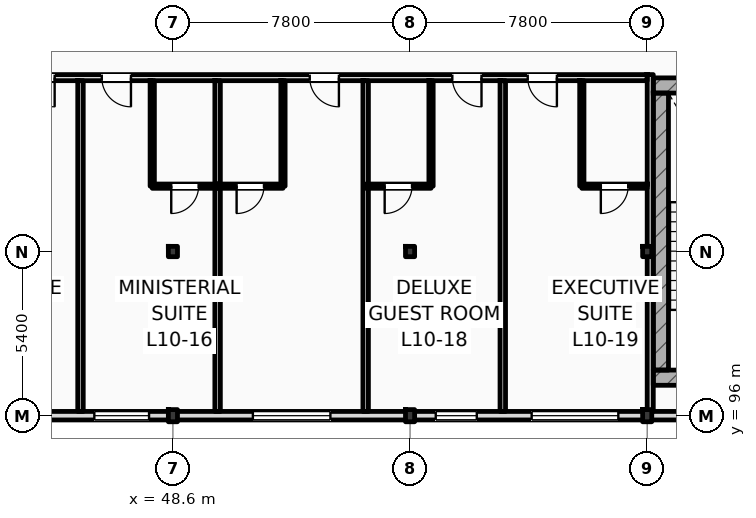
"""IFC4 building model, lengths in metres.
Left out: names, types, materials, properties, quantities, classifications, styles, units other than length and angle.
Written with IfcOpenShell. Run it as: python <this file> out.ifc"""

import sys

from ifc_helpers import new_model, si_unit, direction, frame, frame_2d, origin, origin_2d, place, context, subcontext, project, spatial, rectangle, i_section, extrude, element, fill, save


model = new_model("IFC4")
c1 = context("Model", 3, precision=1e-05, world=origin(), true_north=direction((0.0, 1.0)))
c2 = subcontext(c1, "Body", "Model", "MODEL_VIEW")
j1 = project(units=[si_unit("LENGTHUNIT", "METRE"), si_unit("PLANEANGLEUNIT", "RADIAN")], contexts=[c1])
p1 = place(None, origin())
s1 = spatial("IfcSite", under=j1, at=p1, CompositionType="ELEMENT")
p2 = place(p1, origin())
s2 = spatial("IfcBuilding", under=s1, at=p2, CompositionType="ELEMENT")
p3 = place(p2, frame((0.0, 0.0, 42.6)))
s3 = spatial("IfcBuildingStorey", under=s2, at=p3, CompositionType="ELEMENT", Elevation=42.6)
p4 = place(p3, frame((48.6, 96.0, 0.0), z_axis=(0.0, 0.0, 1.0), x_axis=(1.0, 0.0, 0.0)))
e1 = element("IfcColumn", 1, at=p4, inside=s3, PredefinedType="COLUMN", context=c2, shape_type="SweptSolid", body=[
    extrude(i_section(OverallWidth=0.3, OverallDepth=0.4, WebThickness=0.013, FlangeThickness=0.024, FilletRadius=0.027, at=origin_2d()), origin(), (0.0, 0.0, 1.0), 4.2),
])
p5 = place(p3, frame((48.6, 101.4, 0.0), z_axis=(0.0, 0.0, 1.0), x_axis=(1.0, 0.0, 0.0)))
e2 = element("IfcColumn", 2, at=p5, inside=s3, PredefinedType="COLUMN", context=c2, shape_type="SweptSolid", body=[
    extrude(i_section(OverallWidth=0.3, OverallDepth=0.34, WebThickness=0.012, FlangeThickness=0.021, FilletRadius=0.027, at=origin_2d()), origin(), (0.0, 0.0, 1.0), 4.2),
])
p6 = place(p3, frame((56.4, 96.0, 0.0), z_axis=(0.0, 0.0, 1.0), x_axis=(1.0, 0.0, 0.0)))
e3 = element("IfcColumn", 3, at=p6, inside=s3, PredefinedType="COLUMN", context=c2, shape_type="SweptSolid", body=[
    extrude(i_section(OverallWidth=0.3, OverallDepth=0.4, WebThickness=0.013, FlangeThickness=0.024, FilletRadius=0.027, at=origin_2d()), origin(), (0.0, 0.0, 1.0), 4.2),
])
p7 = place(p3, frame((56.4, 101.4, 0.0), z_axis=(0.0, 0.0, 1.0), x_axis=(1.0, 0.0, 0.0)))
e4 = element("IfcColumn", 4, at=p7, inside=s3, PredefinedType="COLUMN", context=c2, shape_type="SweptSolid", body=[
    extrude(i_section(OverallWidth=0.3, OverallDepth=0.34, WebThickness=0.012, FlangeThickness=0.021, FilletRadius=0.027, at=origin_2d()), origin(), (0.0, 0.0, 1.0), 4.2),
])
p8 = place(p3, frame((64.2, 96.0, 0.0), z_axis=(0.0, 0.0, 1.0), x_axis=(1.0, 0.0, 0.0)))
e5 = element("IfcColumn", 5, at=p8, inside=s3, PredefinedType="COLUMN", context=c2, shape_type="SweptSolid", body=[
    extrude(i_section(OverallWidth=0.3, OverallDepth=0.4, WebThickness=0.013, FlangeThickness=0.024, FilletRadius=0.027, at=origin_2d()), origin(), (0.0, 0.0, 1.0), 4.2),
])
p9 = place(p3, frame((64.2, 101.4, 0.0), z_axis=(0.0, 0.0, 1.0), x_axis=(1.0, 0.0, 0.0)))
e6 = element("IfcColumn", 6, at=p9, inside=s3, PredefinedType="COLUMN", context=c2, shape_type="SweptSolid", body=[
    extrude(i_section(OverallWidth=0.3, OverallDepth=0.34, WebThickness=0.012, FlangeThickness=0.021, FilletRadius=0.027, at=origin_2d()), origin(), (0.0, 0.0, 1.0), 4.2),
])
for number, where, z_axis, x_axis in (
    (7, (64.4, 106.862, 0.0), (0.0, 0.0, 1.0), (1.0, 0.0, 0.0)),
    (8, (64.4, 97.25, 0.0), (0.0, 0.0, 1.0), (1.0, 0.0, 0.0)),
):
    element("IfcWall", number, at=place(p3, frame(where, z_axis=z_axis, x_axis=x_axis)), inside=s3, PredefinedType="SHEAR", context=c2, shape_type="SweptSolid", body=[
        extrude(rectangle(XDim=5.16, YDim=0.5, at=frame_2d((2.58, 0.0))), origin(), (0.0, 0.0, 1.0), 4.2),
    ])
p10 = place(p3, frame((64.65, 97.5, 0.0), z_axis=(0.0, 0.0, 1.0), x_axis=(0.0, 1.0, 0.0)))
e9 = element("IfcWall", 9, at=p10, inside=s3, PredefinedType="SHEAR", context=c2, shape_type="SweptSolid", body=[
    extrude(rectangle(XDim=9.112, YDim=0.5, at=frame_2d((4.556, 0.0))), origin(), (0.0, 0.0, 1.0), 4.2),
])
p11 = place(p3, frame((25.2, 96.0, 0.0), z_axis=(0.0, 0.0, 1.0), x_axis=(1.0, 0.0, 0.0)))
e10 = element("IfcWall", 10, at=p11, inside=s3, PredefinedType="STANDARD", context=c2, shape_type="SweptSolid", body=[
    extrude(rectangle(XDim=70.2, YDim=0.28, at=frame_2d((35.1, 0.0))), origin(), (0.0, 0.0, 1.0), 3.42),
])
p12 = place(p11, frame((16.83, 0.0, 0.9)))
e11 = element("IfcOpeningElement", 11, at=p12, cuts=e10, PredefinedType="OPENING", context=c2, shape_type="SweptSolid", body=[
    extrude(rectangle(XDim=2.25, YDim=2.15, at=frame_2d((1.125, 1.075))), frame((0.0, 0.15, 0.0), z_axis=(0.0, -1.0, 0.0), x_axis=(1.0, 0.0, 0.0)), (0.0, 0.0, 1.0), 0.3),
])
p13 = place(p11, frame((20.815, 0.0, 0.9)))
e12 = element("IfcOpeningElement", 12, at=p13, cuts=e10, PredefinedType="OPENING", context=c2, shape_type="SweptSolid", body=[
    extrude(rectangle(XDim=1.8, YDim=2.2, at=frame_2d((0.9, 1.1))), frame((0.0, 0.15, 0.0), z_axis=(0.0, -1.0, 0.0), x_axis=(1.0, 0.0, 0.0)), (0.0, 0.0, 1.0), 0.3),
])
p14 = place(p11, frame((26.03, 0.0, 0.9)))
e13 = element("IfcOpeningElement", 13, at=p14, cuts=e10, PredefinedType="OPENING", context=c2, shape_type="SweptSolid", body=[
    extrude(rectangle(XDim=2.55, YDim=2.25, at=frame_2d((1.275, 1.125))), frame((0.0, 0.15, 0.0), z_axis=(0.0, -1.0, 0.0), x_axis=(1.0, 0.0, 0.0)), (0.0, 0.0, 1.0), 0.3),
])
p15 = place(p11, frame((32.045, 0.0, 0.9)))
e14 = element("IfcOpeningElement", 14, at=p15, cuts=e10, PredefinedType="OPENING", context=c2, shape_type="SweptSolid", body=[
    extrude(rectangle(XDim=1.35, YDim=2.3, at=frame_2d((0.675, 1.15))), frame((0.0, 0.15, 0.0), z_axis=(0.0, -1.0, 0.0), x_axis=(1.0, 0.0, 0.0)), (0.0, 0.0, 1.0), 0.3),
])
p16 = place(p11, frame((35.2, 0.0, 0.9)))
e15 = element("IfcOpeningElement", 15, at=p16, cuts=e10, PredefinedType="OPENING", context=c2, shape_type="SweptSolid", body=[
    extrude(rectangle(XDim=2.85, YDim=2.34, at=frame_2d((1.425, 1.17))), frame((0.0, 0.15, 0.0), z_axis=(0.0, -1.0, 0.0), x_axis=(1.0, 0.0, 0.0)), (0.0, 0.0, 1.0), 0.3),
])
p17 = place(p11, frame((55.544, 0.0, 0.9)))
e16 = element("IfcOpeningElement", 16, at=p17, cuts=e10, PredefinedType="OPENING", context=c2, shape_type="SweptSolid", body=[
    extrude(rectangle(XDim=3.0, YDim=2.34, at=frame_2d((1.5, 1.17))), frame((0.0, 0.15, 0.0), z_axis=(0.0, -1.0, 0.0), x_axis=(1.0, 0.0, 0.0)), (0.0, 0.0, 1.0), 0.3),
])
p18 = place(p11, frame((60.151, 0.0, 0.9)))
e17 = element("IfcOpeningElement", 17, at=p18, cuts=e10, PredefinedType="OPENING", context=c2, shape_type="SweptSolid", body=[
    extrude(rectangle(XDim=1.35, YDim=2.34, at=frame_2d((0.675, 1.17))), frame((0.0, 0.15, 0.0), z_axis=(0.0, -1.0, 0.0), x_axis=(1.0, 0.0, 0.0)), (0.0, 0.0, 1.0), 0.3),
])
p19 = place(p11, frame((65.582, 0.0, 0.9)))
e18 = element("IfcOpeningElement", 18, at=p19, cuts=e10, PredefinedType="OPENING", context=c2, shape_type="SweptSolid", body=[
    extrude(rectangle(XDim=3.4, YDim=2.34, at=frame_2d((1.7, 1.17))), frame((0.0, 0.15, 0.0), z_axis=(0.0, -1.0, 0.0), x_axis=(1.0, 0.0, 0.0)), (0.0, 0.0, 1.0), 0.3),
])
p20 = place(p3, frame((40.76, 107.12, 0.0), z_axis=(0.0, 0.0, 1.0), x_axis=(1.0, 0.0, 0.0)))
e19 = element("IfcWall", 19, at=p20, inside=s3, PredefinedType="PARTITIONING", context=c2, shape_type="SweptSolid", body=[
    extrude(rectangle(XDim=23.44, YDim=0.2, at=frame_2d((11.72, 0.0))), origin(), (0.0, 0.0, 1.0), 3.94),
])
p21 = place(p20, frame((2.99, 0.0, 0.0)))
e20 = element("IfcOpeningElement", 20, at=p21, cuts=e19, PredefinedType="OPENING", context=c2, shape_type="SweptSolid", body=[
    extrude(rectangle(XDim=0.96, YDim=2.2, at=frame_2d((0.48, 1.1))), frame((0.0, 0.11, 0.0), z_axis=(0.0, -1.0, 0.0), x_axis=(1.0, 0.0, 0.0)), (0.0, 0.0, 1.0), 0.22),
])
p22 = place(p20, frame((5.5, 0.0, 0.0)))
e21 = element("IfcOpeningElement", 21, at=p22, cuts=e19, PredefinedType="OPENING", context=c2, shape_type="SweptSolid", body=[
    extrude(rectangle(XDim=0.96, YDim=2.2, at=frame_2d((0.48, 1.1))), frame((0.0, 0.11, 0.0), z_axis=(0.0, -1.0, 0.0), x_axis=(1.0, 0.0, 0.0)), (0.0, 0.0, 1.0), 0.22),
])
p23 = place(p20, frame((12.34, 0.0, 0.0)))
e22 = element("IfcOpeningElement", 22, at=p23, cuts=e19, PredefinedType="OPENING", context=c2, shape_type="SweptSolid", body=[
    extrude(rectangle(XDim=0.96, YDim=2.2, at=frame_2d((0.48, 1.1))), frame((0.0, 0.11, 0.0), z_axis=(0.0, -1.0, 0.0), x_axis=(1.0, 0.0, 0.0)), (0.0, 0.0, 1.0), 0.22),
])
p24 = place(p20, frame((17.03, 0.0, 0.0)))
e23 = element("IfcOpeningElement", 23, at=p24, cuts=e19, PredefinedType="OPENING", context=c2, shape_type="SweptSolid", body=[
    extrude(rectangle(XDim=0.96, YDim=2.2, at=frame_2d((0.48, 1.1))), frame((0.0, 0.11, 0.0), z_axis=(0.0, -1.0, 0.0), x_axis=(1.0, 0.0, 0.0)), (0.0, 0.0, 1.0), 0.22),
])
p25 = place(p20, frame((19.51, 0.0, 0.0)))
e24 = element("IfcOpeningElement", 24, at=p25, cuts=e19, PredefinedType="OPENING", context=c2, shape_type="SweptSolid", body=[
    extrude(rectangle(XDim=0.96, YDim=2.2, at=frame_2d((0.48, 1.1))), frame((0.0, 0.11, 0.0), z_axis=(0.0, -1.0, 0.0), x_axis=(1.0, 0.0, 0.0)), (0.0, 0.0, 1.0), 0.22),
])
p26 = place(p3, frame((64.3, 96.14, 0.0), z_axis=(0.0, 0.0, 1.0), x_axis=(0.0, 1.0, 0.0)))
e25 = element("IfcWall", 25, at=p26, inside=s3, PredefinedType="PARTITIONING", context=c2, shape_type="SweptSolid", body=[
    extrude(rectangle(XDim=11.08, YDim=0.2, at=frame_2d((5.54, 0.0))), origin(), (0.0, 0.0, 1.0), 3.57),
])
for number, where, z_axis, x_axis in (
    (26, (45.56, 96.14, 0.0), (0.0, 0.0, 1.0), (0.0, 1.0, 0.0)),
    (27, (50.07, 96.14, 0.0), (0.0, 0.0, 1.0), (0.0, 1.0, 0.0)),
):
    element("IfcWall", number, at=place(p3, frame(where, z_axis=z_axis, x_axis=x_axis)), inside=s3, PredefinedType="PARTITIONING", context=c2, shape_type="SweptSolid", body=[
        extrude(rectangle(XDim=10.88, YDim=0.18, at=frame_2d((5.44, 0.0))), origin(), (0.0, 0.0, 1.0), 3.94),
    ])
p27 = place(p3, frame((47.92, 103.55, 0.0), z_axis=(0.0, 0.0, 1.0), x_axis=(0.0, 1.0, 0.0)))
e28 = element("IfcWall", 28, at=p27, inside=s3, PredefinedType="PARTITIONING", context=c2, shape_type="SweptSolid", body=[
    extrude(rectangle(XDim=3.47, YDim=0.14, at=frame_2d((1.735, 0.0))), origin(), (0.0, 0.0, 1.0), 3.94),
])
p28 = place(p3, frame((47.92, 103.55, 0.0), z_axis=(0.0, 0.0, 1.0), x_axis=(1.0, 0.0, 0.0)))
e29 = element("IfcWall", 29, at=p28, inside=s3, PredefinedType="PARTITIONING", context=c2, shape_type="SweptSolid", body=[
    extrude(rectangle(XDim=2.15, YDim=0.14, at=frame_2d((1.075, 0.0))), origin(), (0.0, 0.0, 1.0), 3.94),
])
p29 = place(p28, frame((0.625, 0.0, 0.0)))
e30 = element("IfcOpeningElement", 30, at=p29, cuts=e29, PredefinedType="OPENING", context=c2, shape_type="SweptSolid", body=[
    extrude(rectangle(XDim=0.9, YDim=2.1, at=frame_2d((0.45, 1.05))), frame((0.0, 0.08, 0.0), z_axis=(0.0, -1.0, 0.0), x_axis=(1.0, 0.0, 0.0)), (0.0, 0.0, 1.0), 0.16),
])
p30 = place(p3, frame((54.94, 96.14, 0.0), z_axis=(0.0, 0.0, 1.0), x_axis=(0.0, 1.0, 0.0)))
e31 = element("IfcWall", 31, at=p30, inside=s3, PredefinedType="PARTITIONING", context=c2, shape_type="SweptSolid", body=[
    extrude(rectangle(XDim=10.88, YDim=0.18, at=frame_2d((5.44, 0.0))), origin(), (0.0, 0.0, 1.0), 3.94),
])
p31 = place(p3, frame((52.22, 103.55, 0.0), z_axis=(0.0, 0.0, 1.0), x_axis=(0.0, 1.0, 0.0)))
e32 = element("IfcWall", 32, at=p31, inside=s3, PredefinedType="PARTITIONING", context=c2, shape_type="SweptSolid", body=[
    extrude(rectangle(XDim=3.47, YDim=0.14, at=frame_2d((1.735, 0.0))), origin(), (0.0, 0.0, 1.0), 3.94),
])
p32 = place(p3, frame((50.07, 103.55, 0.0), z_axis=(0.0, 0.0, 1.0), x_axis=(1.0, 0.0, 0.0)))
e33 = element("IfcWall", 33, at=p32, inside=s3, PredefinedType="PARTITIONING", context=c2, shape_type="SweptSolid", body=[
    extrude(rectangle(XDim=2.15, YDim=0.14, at=frame_2d((1.075, 0.0))), origin(), (0.0, 0.0, 1.0), 3.94),
])
p33 = place(p32, frame((0.625, 0.0, 0.0)))
e34 = element("IfcOpeningElement", 34, at=p33, cuts=e33, PredefinedType="OPENING", context=c2, shape_type="SweptSolid", body=[
    extrude(rectangle(XDim=0.9, YDim=2.1, at=frame_2d((0.45, 1.05))), frame((0.0, 0.08, 0.0), z_axis=(0.0, -1.0, 0.0), x_axis=(1.0, 0.0, 0.0)), (0.0, 0.0, 1.0), 0.16),
])
p34 = place(p3, frame((59.45, 96.14, 0.0), z_axis=(0.0, 0.0, 1.0), x_axis=(0.0, 1.0, 0.0)))
e35 = element("IfcWall", 35, at=p34, inside=s3, PredefinedType="PARTITIONING", context=c2, shape_type="SweptSolid", body=[
    extrude(rectangle(XDim=10.88, YDim=0.18, at=frame_2d((5.44, 0.0))), origin(), (0.0, 0.0, 1.0), 3.94),
])
p35 = place(p3, frame((57.09, 103.55, 0.0), z_axis=(0.0, 0.0, 1.0), x_axis=(0.0, 1.0, 0.0)))
e36 = element("IfcWall", 36, at=p35, inside=s3, PredefinedType="PARTITIONING", context=c2, shape_type="SweptSolid", body=[
    extrude(rectangle(XDim=3.47, YDim=0.14, at=frame_2d((1.735, 0.0))), origin(), (0.0, 0.0, 1.0), 3.94),
])
p36 = place(p3, frame((54.94, 103.55, 0.0), z_axis=(0.0, 0.0, 1.0), x_axis=(1.0, 0.0, 0.0)))
e37 = element("IfcWall", 37, at=p36, inside=s3, PredefinedType="PARTITIONING", context=c2, shape_type="SweptSolid", body=[
    extrude(rectangle(XDim=2.15, YDim=0.14, at=frame_2d((1.075, 0.0))), origin(), (0.0, 0.0, 1.0), 3.94),
])
p37 = place(p36, frame((0.625, 0.0, 0.0)))
e38 = element("IfcOpeningElement", 38, at=p37, cuts=e37, PredefinedType="OPENING", context=c2, shape_type="SweptSolid", body=[
    extrude(rectangle(XDim=0.9, YDim=2.1, at=frame_2d((0.45, 1.05))), frame((0.0, 0.08, 0.0), z_axis=(0.0, -1.0, 0.0), x_axis=(1.0, 0.0, 0.0)), (0.0, 0.0, 1.0), 0.16),
])
p38 = place(p3, frame((62.05, 103.55, 0.0), z_axis=(0.0, 0.0, 1.0), x_axis=(0.0, 1.0, 0.0)))
e39 = element("IfcWall", 39, at=p38, inside=s3, PredefinedType="PARTITIONING", context=c2, shape_type="SweptSolid", body=[
    extrude(rectangle(XDim=3.47, YDim=0.14, at=frame_2d((1.735, 0.0))), origin(), (0.0, 0.0, 1.0), 3.94),
])
p39 = place(p3, frame((62.05, 103.55, 0.0), z_axis=(0.0, 0.0, 1.0), x_axis=(1.0, 0.0, 0.0)))
e40 = element("IfcWall", 40, at=p39, inside=s3, PredefinedType="PARTITIONING", context=c2, shape_type="SweptSolid", body=[
    extrude(rectangle(XDim=2.15, YDim=0.14, at=frame_2d((1.075, 0.0))), origin(), (0.0, 0.0, 1.0), 3.94),
])
p40 = place(p39, frame((0.625, 0.0, 0.0)))
e41 = element("IfcOpeningElement", 41, at=p40, cuts=e40, PredefinedType="OPENING", context=c2, shape_type="SweptSolid", body=[
    extrude(rectangle(XDim=0.9, YDim=2.1, at=frame_2d((0.45, 1.05))), frame((0.0, 0.08, 0.0), z_axis=(0.0, -1.0, 0.0), x_axis=(1.0, 0.0, 0.0)), (0.0, 0.0, 1.0), 0.16),
])
p41 = place(p13, origin())
e42 = element("IfcWindow", 42, at=p41, inside=s3, PartitioningType="DOUBLE_PANEL_VERTICAL", PredefinedType="WINDOW", context=c2, shape_type="SweptSolid", body=[
    extrude(rectangle(XDim=1.8, YDim=2.2, at=frame_2d((0.9, 1.1))), frame((0.0, 0.03, 0.0), z_axis=(0.0, -1.0, 0.0), x_axis=(1.0, 0.0, 0.0)), (0.0, 0.0, 1.0), 0.06),
])
fill(e12, e42)
p42 = place(p14, origin())
e43 = element("IfcWindow", 43, at=p42, inside=s3, PartitioningType="DOUBLE_PANEL_VERTICAL", PredefinedType="WINDOW", context=c2, shape_type="SweptSolid", body=[
    extrude(rectangle(XDim=2.55, YDim=2.25, at=frame_2d((1.275, 1.125))), frame((0.0, 0.03, 0.0), z_axis=(0.0, -1.0, 0.0), x_axis=(1.0, 0.0, 0.0)), (0.0, 0.0, 1.0), 0.06),
])
fill(e13, e43)
p43 = place(p15, origin())
e44 = element("IfcWindow", 44, at=p43, inside=s3, PartitioningType="DOUBLE_PANEL_VERTICAL", PredefinedType="WINDOW", context=c2, shape_type="SweptSolid", body=[
    extrude(rectangle(XDim=1.35, YDim=2.3, at=frame_2d((0.675, 1.15))), frame((0.0, 0.03, 0.0), z_axis=(0.0, -1.0, 0.0), x_axis=(1.0, 0.0, 0.0)), (0.0, 0.0, 1.0), 0.06),
])
fill(e14, e44)
p44 = place(p16, origin())
e45 = element("IfcWindow", 45, at=p44, inside=s3, PartitioningType="DOUBLE_PANEL_VERTICAL", PredefinedType="WINDOW", context=c2, shape_type="SweptSolid", body=[
    extrude(rectangle(XDim=2.85, YDim=2.34, at=frame_2d((1.425, 1.17))), frame((0.0, 0.03, 0.0), z_axis=(0.0, -1.0, 0.0), x_axis=(1.0, 0.0, 0.0)), (0.0, 0.0, 1.0), 0.06),
])
fill(e15, e45)
p45 = place(p21, frame((0.96, 0.0, 0.0), z_axis=(0.0, 0.0, 1.0), x_axis=(-1.0, 0.0, 0.0)))
e46 = element("IfcDoor", 46, at=p45, inside=s3, OperationType="SINGLE_SWING_RIGHT", PredefinedType="DOOR", context=c2, shape_type="SweptSolid", body=[
    extrude(rectangle(XDim=0.96, YDim=2.2, at=frame_2d((0.48, 1.1))), frame((0.0, 0.025, 0.0), z_axis=(0.0, -1.0, 0.0), x_axis=(1.0, 0.0, 0.0)), (0.0, 0.0, 1.0), 0.05),
])
fill(e20, e46)
p46 = place(p22, frame((0.96, 0.0, 0.0), z_axis=(0.0, 0.0, 1.0), x_axis=(-1.0, 0.0, 0.0)))
e47 = element("IfcDoor", 47, at=p46, inside=s3, OperationType="SINGLE_SWING_RIGHT", PredefinedType="DOOR", context=c2, shape_type="SweptSolid", body=[
    extrude(rectangle(XDim=0.96, YDim=2.2, at=frame_2d((0.48, 1.1))), frame((0.0, 0.025, 0.0), z_axis=(0.0, -1.0, 0.0), x_axis=(1.0, 0.0, 0.0)), (0.0, 0.0, 1.0), 0.05),
])
fill(e21, e47)
p47 = place(p29, frame((0.9, 0.0, 0.0), z_axis=(0.0, 0.0, 1.0), x_axis=(-1.0, 0.0, 0.0)))
e48 = element("IfcDoor", 48, at=p47, inside=s3, OperationType="SINGLE_SWING_LEFT", PredefinedType="DOOR", context=c2, shape_type="SweptSolid", body=[
    extrude(rectangle(XDim=0.9, YDim=2.1, at=frame_2d((0.45, 1.05))), frame((0.0, 0.025, 0.0), z_axis=(0.0, -1.0, 0.0), x_axis=(1.0, 0.0, 0.0)), (0.0, 0.0, 1.0), 0.05),
])
fill(e30, e48)
p48 = place(p23, frame((0.96, 0.0, 0.0), z_axis=(0.0, 0.0, 1.0), x_axis=(-1.0, 0.0, 0.0)))
e49 = element("IfcDoor", 49, at=p48, inside=s3, OperationType="SINGLE_SWING_RIGHT", PredefinedType="DOOR", context=c2, shape_type="SweptSolid", body=[
    extrude(rectangle(XDim=0.96, YDim=2.2, at=frame_2d((0.48, 1.1))), frame((0.0, 0.025, 0.0), z_axis=(0.0, -1.0, 0.0), x_axis=(1.0, 0.0, 0.0)), (0.0, 0.0, 1.0), 0.05),
])
fill(e22, e49)
p49 = place(p33, frame((0.9, 0.0, 0.0), z_axis=(0.0, 0.0, 1.0), x_axis=(-1.0, 0.0, 0.0)))
e50 = element("IfcDoor", 50, at=p49, inside=s3, OperationType="SINGLE_SWING_LEFT", PredefinedType="DOOR", context=c2, shape_type="SweptSolid", body=[
    extrude(rectangle(XDim=0.9, YDim=2.1, at=frame_2d((0.45, 1.05))), frame((0.0, 0.025, 0.0), z_axis=(0.0, -1.0, 0.0), x_axis=(1.0, 0.0, 0.0)), (0.0, 0.0, 1.0), 0.05),
])
fill(e34, e50)
p50 = place(p24, frame((0.96, 0.0, 0.0), z_axis=(0.0, 0.0, 1.0), x_axis=(-1.0, 0.0, 0.0)))
e51 = element("IfcDoor", 51, at=p50, inside=s3, OperationType="SINGLE_SWING_RIGHT", PredefinedType="DOOR", context=c2, shape_type="SweptSolid", body=[
    extrude(rectangle(XDim=0.96, YDim=2.2, at=frame_2d((0.48, 1.1))), frame((0.0, 0.025, 0.0), z_axis=(0.0, -1.0, 0.0), x_axis=(1.0, 0.0, 0.0)), (0.0, 0.0, 1.0), 0.05),
])
fill(e23, e51)
p51 = place(p37, frame((0.9, 0.0, 0.0), z_axis=(0.0, 0.0, 1.0), x_axis=(-1.0, 0.0, 0.0)))
e52 = element("IfcDoor", 52, at=p51, inside=s3, OperationType="SINGLE_SWING_LEFT", PredefinedType="DOOR", context=c2, shape_type="SweptSolid", body=[
    extrude(rectangle(XDim=0.9, YDim=2.1, at=frame_2d((0.45, 1.05))), frame((0.0, 0.025, 0.0), z_axis=(0.0, -1.0, 0.0), x_axis=(1.0, 0.0, 0.0)), (0.0, 0.0, 1.0), 0.05),
])
fill(e38, e52)
p52 = place(p25, frame((0.96, 0.0, 0.0), z_axis=(0.0, 0.0, 1.0), x_axis=(-1.0, 0.0, 0.0)))
e53 = element("IfcDoor", 53, at=p52, inside=s3, OperationType="SINGLE_SWING_RIGHT", PredefinedType="DOOR", context=c2, shape_type="SweptSolid", body=[
    extrude(rectangle(XDim=0.96, YDim=2.2, at=frame_2d((0.48, 1.1))), frame((0.0, 0.025, 0.0), z_axis=(0.0, -1.0, 0.0), x_axis=(1.0, 0.0, 0.0)), (0.0, 0.0, 1.0), 0.05),
])
fill(e24, e53)
p53 = place(p40, frame((0.9, 0.0, 0.0), z_axis=(0.0, 0.0, 1.0), x_axis=(-1.0, 0.0, 0.0)))
e54 = element("IfcDoor", 54, at=p53, inside=s3, OperationType="SINGLE_SWING_LEFT", PredefinedType="DOOR", context=c2, shape_type="SweptSolid", body=[
    extrude(rectangle(XDim=0.9, YDim=2.1, at=frame_2d((0.45, 1.05))), frame((0.0, 0.025, 0.0), z_axis=(0.0, -1.0, 0.0), x_axis=(1.0, 0.0, 0.0)), (0.0, 0.0, 1.0), 0.05),
])
fill(e41, e54)
save(model, sys.argv[1])
